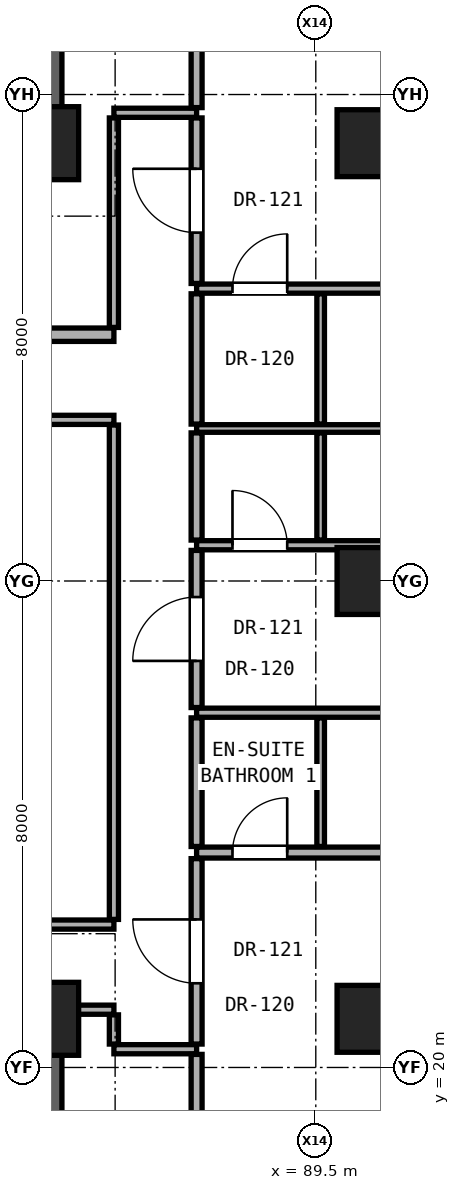
"""IFC4 building model, lengths in metres.
Left out: names, types, materials, properties, quantities, classifications, styles, units other than length and angle.
Written with IfcOpenShell. Run it as: python <this file> out.ifc"""

import sys

from ifc_helpers import new_model, si_unit, direction, frame, frame_2d, origin, origin_2d, place, context, subcontext, project, spatial, rectangle, hollow_rectangle, extrude, element, fill, save


model = new_model("IFC4")
c1 = context("Model", 3, precision=1e-05, world=origin(), true_north=direction((0.0, 1.0)))
c2 = subcontext(c1, "Body", "Model", "MODEL_VIEW")
j1 = project(units=[si_unit("LENGTHUNIT", "METRE"), si_unit("PLANEANGLEUNIT", "RADIAN")], contexts=[c1])
p1 = place(None, origin())
s1 = spatial("IfcSite", under=j1, at=p1, CompositionType="ELEMENT")
p2 = place(p1, origin())
s2 = spatial("IfcBuilding", under=s1, at=p2, CompositionType="ELEMENT")
p3 = place(p2, frame((0.0, 0.0, 108.2)))
s3 = spatial("IfcBuildingStorey", under=s2, at=p3, CompositionType="ELEMENT", Elevation=108.2)
for number, where, z_axis, x_axis in (
    (1, (85.0, 20.8, 0.0), (0.0, 0.0, 1.0), (1.0, 0.0, 0.0)),
    (2, (85.0, 35.2, 0.0), (0.0, 0.0, 1.0), (1.0, 0.0, 0.0)),
):
    element("IfcColumn", number, at=place(p3, frame(where, z_axis=z_axis, x_axis=x_axis)), inside=s3, PredefinedType="COLUMN", context=c2, shape_type="SweptSolid", body=[
        extrude(rectangle(XDim=1.2, YDim=1.2, at=origin_2d()), origin(), (0.0, 0.0, 1.0), 3.3),
    ])
for number, where, z_axis, x_axis in (
    (3, (90.4, 20.8, 0.0), (0.0, 0.0, 1.0), (1.0, 0.0, 0.0)),
    (4, (90.4, 28.0, 0.0), (0.0, 0.0, 1.0), (1.0, 0.0, 0.0)),
    (5, (90.4, 35.2, 0.0), (0.0, 0.0, 1.0), (1.0, 0.0, 0.0)),
):
    element("IfcColumn", number, at=place(p3, frame(where, z_axis=z_axis, x_axis=x_axis)), inside=s3, PredefinedType="COLUMN", context=c2, shape_type="SweptSolid", body=[
        extrude(hollow_rectangle(XDim=1.1, YDim=1.1, WallThickness=0.06, at=origin_2d()), origin(), (0.0, 0.0, 1.0), 3.3),
    ])
for number, where, z_axis, x_axis in (
    (6, (85.0, 35.2, 0.0), (0.0, 0.0, 1.0), (0.0, 1.0, 0.0)),
    (7, (85.0, 15.2, 0.0), (0.0, 0.0, 1.0), (0.0, 1.0, 0.0)),
):
    element("IfcWall", number, at=place(p3, frame(where, z_axis=z_axis, x_axis=x_axis)), inside=s3, PredefinedType="SHEAR", context=c2, shape_type="SweptSolid", body=[
        extrude(rectangle(XDim=5.6, YDim=0.65, at=frame_2d((2.8, 0.0))), origin(), (0.0, 0.0, 1.0), 3.08),
    ])
p4 = place(p3, frame((86.18, 20.3, 0.0), z_axis=(0.0, 0.0, 1.0), x_axis=(1.0, 0.0, 0.0)))
e8 = element("IfcWall", 8, at=p4, inside=s3, PredefinedType="PARTITIONING", context=c2, shape_type="SweptSolid", body=[
    extrude(rectangle(XDim=1.36, YDim=0.15, at=frame_2d((0.68, 0.0))), origin(), (0.0, 0.0, 1.0), 3.08),
])
p5 = place(p3, frame((85.32, 20.95, 0.0), z_axis=(0.0, 0.0, 1.0), x_axis=(1.0, 0.0, 0.0)))
e9 = element("IfcWall", 9, at=p5, inside=s3, PredefinedType="PARTITIONING", context=c2, shape_type="SweptSolid", body=[
    extrude(rectangle(XDim=0.86, YDim=0.15, at=frame_2d((0.43, 0.0))), origin(), (0.0, 0.0, 1.0), 2.472),
])
p6 = place(p3, frame((66.68, 22.35, 0.0), z_axis=(0.0, 0.0, 1.0), x_axis=(1.0, 0.0, 0.0)))
e10 = element("IfcWall", 10, at=p6, inside=s3, PredefinedType="PARTITIONING", context=c2, shape_type="SweptSolid", body=[
    extrude(rectangle(XDim=19.5, YDim=0.15, at=frame_2d((9.75, 0.0))), origin(), (0.0, 0.0, 1.0), 2.145),
])
p7 = place(p6, frame((8.053, 0.0, 0.0)))
e11 = element("IfcOpeningElement", 11, at=p7, cuts=e10, PredefinedType="OPENING", context=c2, shape_type="SweptSolid", body=[
    extrude(rectangle(XDim=0.85, YDim=2.01, at=frame_2d((0.425, 1.005))), frame((0.0, 0.085, 0.0), z_axis=(0.0, -1.0, 0.0), x_axis=(1.0, 0.0, 0.0)), (0.0, 0.0, 1.0), 0.17),
])
p8 = place(p3, frame((87.54, 23.534, 0.0), z_axis=(0.0, 0.0, 1.0), x_axis=(1.0, 0.0, 0.0)))
e12 = element("IfcWall", 12, at=p8, inside=s3, PredefinedType="PARTITIONING", context=c2, shape_type="SweptSolid", body=[
    extrude(rectangle(XDim=7.53, YDim=0.18, at=frame_2d((3.765, 0.0))), origin(), (0.0, 0.0, 1.0), 2.216),
])
p9 = place(p8, frame((4.29, 0.0, 0.0)))
e13 = element("IfcOpeningElement", 13, at=p9, cuts=e12, PredefinedType="OPENING", context=c2, shape_type="SweptSolid", body=[
    extrude(rectangle(XDim=0.95, YDim=2.15, at=frame_2d((0.475, 1.075))), frame((0.0, 0.1, 0.0), z_axis=(0.0, -1.0, 0.0), x_axis=(1.0, 0.0, 0.0)), (0.0, 0.0, 1.0), 0.2),
])
p10 = place(p8, frame((0.59, 0.0, 0.0)))
e14 = element("IfcOpeningElement", 14, at=p10, cuts=e12, PredefinedType="OPENING", context=c2, shape_type="SweptSolid", body=[
    extrude(rectangle(XDim=0.9, YDim=2.1, at=frame_2d((0.45, 1.05))), frame((0.0, 0.1, 0.0), z_axis=(0.0, -1.0, 0.0), x_axis=(1.0, 0.0, 0.0)), (0.0, 0.0, 1.0), 0.2),
])
p11 = place(p3, frame((87.54, 25.834, 0.0), z_axis=(0.0, 0.0, 1.0), x_axis=(1.0, 0.0, 0.0)))
e15 = element("IfcWall", 15, at=p11, inside=s3, PredefinedType="PARTITIONING", context=c2, shape_type="SweptSolid", body=[
    extrude(rectangle(XDim=7.53, YDim=0.15, at=frame_2d((3.765, 0.0))), origin(), (0.0, 0.0, 1.0), 2.216),
])
p12 = place(p3, frame((87.54, 28.588, 0.0), z_axis=(0.0, 0.0, 1.0), x_axis=(1.0, 0.0, 0.0)))
e16 = element("IfcWall", 16, at=p12, inside=s3, PredefinedType="PARTITIONING", context=c2, shape_type="SweptSolid", body=[
    extrude(rectangle(XDim=7.53, YDim=0.15, at=frame_2d((3.765, 0.0))), origin(), (0.0, 0.0, 1.0), 2.216),
])
p13 = place(p12, frame((4.29, 0.0, 0.0)))
e17 = element("IfcOpeningElement", 17, at=p13, cuts=e16, PredefinedType="OPENING", context=c2, shape_type="SweptSolid", body=[
    extrude(rectangle(XDim=0.95, YDim=2.15, at=frame_2d((0.475, 1.075))), frame((0.0, 0.085, 0.0), z_axis=(0.0, -1.0, 0.0), x_axis=(1.0, 0.0, 0.0)), (0.0, 0.0, 1.0), 0.17),
])
p14 = place(p12, frame((0.59, 0.0, 0.0)))
e18 = element("IfcOpeningElement", 18, at=p14, cuts=e16, PredefinedType="OPENING", context=c2, shape_type="SweptSolid", body=[
    extrude(rectangle(XDim=0.9, YDim=2.1, at=frame_2d((0.45, 1.05))), frame((0.0, 0.085, 0.0), z_axis=(0.0, -1.0, 0.0), x_axis=(1.0, 0.0, 0.0)), (0.0, 0.0, 1.0), 0.17),
])
p15 = place(p3, frame((66.68, 30.65, 0.0), z_axis=(0.0, 0.0, 1.0), x_axis=(1.0, 0.0, 0.0)))
e19 = element("IfcWall", 19, at=p15, inside=s3, PredefinedType="PARTITIONING", context=c2, shape_type="SweptSolid", body=[
    extrude(rectangle(XDim=19.5, YDim=0.15, at=frame_2d((9.75, 0.0))), origin(), (0.0, 0.0, 1.0), 2.145),
])
p16 = place(p15, frame((3.795, 0.0, 0.0)))
e20 = element("IfcOpeningElement", 20, at=p16, cuts=e19, PredefinedType="OPENING", context=c2, shape_type="SweptSolid", body=[
    extrude(rectangle(XDim=0.85, YDim=2.01, at=frame_2d((0.425, 1.005))), frame((0.0, 0.085, 0.0), z_axis=(0.0, -1.0, 0.0), x_axis=(1.0, 0.0, 0.0)), (0.0, 0.0, 1.0), 0.17),
])
p17 = place(p15, frame((15.098, 0.0, 0.0)))
e21 = element("IfcOpeningElement", 21, at=p17, cuts=e19, PredefinedType="OPENING", context=c2, shape_type="SweptSolid", body=[
    extrude(rectangle(XDim=0.85, YDim=2.01, at=frame_2d((0.425, 1.005))), frame((0.0, 0.085, 0.0), z_axis=(0.0, -1.0, 0.0), x_axis=(1.0, 0.0, 0.0)), (0.0, 0.0, 1.0), 0.17),
])
p18 = place(p3, frame((87.54, 30.508, 0.0), z_axis=(0.0, 0.0, 1.0), x_axis=(1.0, 0.0, 0.0)))
e22 = element("IfcWall", 22, at=p18, inside=s3, PredefinedType="PARTITIONING", context=c2, shape_type="SweptSolid", body=[
    extrude(rectangle(XDim=7.53, YDim=0.125, at=frame_2d((3.765, 0.0))), origin(), (0.0, 0.0, 1.0), 2.216),
])
p19 = place(p3, frame((71.55, 32.05, 0.0), z_axis=(0.0, 0.0, 1.0), x_axis=(1.0, 0.0, 0.0)))
e23 = element("IfcWall", 23, at=p19, inside=s3, PredefinedType="SOLIDWALL", context=c2, shape_type="SweptSolid", body=[
    extrude(rectangle(XDim=14.63, YDim=0.22, at=frame_2d((7.315, 0.0))), origin(), (0.0, 0.0, 1.0), 2.145),
])
p20 = place(p19, frame((6.065, 0.0, 0.0)))
e24 = element("IfcOpeningElement", 24, at=p20, cuts=e23, PredefinedType="OPENING", context=c2, shape_type="SweptSolid", body=[
    extrude(rectangle(XDim=0.85, YDim=2.01, at=frame_2d((0.425, 1.005))), frame((0.0, 0.12, 0.0), z_axis=(0.0, -1.0, 0.0), x_axis=(1.0, 0.0, 0.0)), (0.0, 0.0, 1.0), 0.24),
])
p21 = place(p19, frame((10.585, 0.0, 0.0)))
e25 = element("IfcOpeningElement", 25, at=p21, cuts=e23, PredefinedType="OPENING", context=c2, shape_type="SweptSolid", body=[
    extrude(rectangle(XDim=0.85, YDim=2.01, at=frame_2d((0.425, 1.005))), frame((0.0, 0.12, 0.0), z_axis=(0.0, -1.0, 0.0), x_axis=(1.0, 0.0, 0.0)), (0.0, 0.0, 1.0), 0.24),
])
p22 = place(p19, frame((1.65, 0.0, 0.0)))
e26 = element("IfcOpeningElement", 26, at=p22, cuts=e23, PredefinedType="OPENING", context=c2, shape_type="SweptSolid", body=[
    extrude(rectangle(XDim=0.85, YDim=2.01, at=frame_2d((0.425, 1.005))), frame((0.0, 0.12, 0.0), z_axis=(0.0, -1.0, 0.0), x_axis=(1.0, 0.0, 0.0)), (0.0, 0.0, 1.0), 0.24),
])
p23 = place(p3, frame((87.54, 32.808, 0.0), z_axis=(0.0, 0.0, 1.0), x_axis=(1.0, 0.0, 0.0)))
e27 = element("IfcWall", 27, at=p23, inside=s3, PredefinedType="PARTITIONING", context=c2, shape_type="SweptSolid", body=[
    extrude(rectangle(XDim=7.53, YDim=0.15, at=frame_2d((3.765, 0.0))), origin(), (0.0, 0.0, 1.0), 2.216),
])
p24 = place(p23, frame((4.29, 0.0, 0.0)))
e28 = element("IfcOpeningElement", 28, at=p24, cuts=e27, PredefinedType="OPENING", context=c2, shape_type="SweptSolid", body=[
    extrude(rectangle(XDim=0.95, YDim=2.15, at=frame_2d((0.475, 1.075))), frame((0.0, 0.085, 0.0), z_axis=(0.0, -1.0, 0.0), x_axis=(1.0, 0.0, 0.0)), (0.0, 0.0, 1.0), 0.17),
])
p25 = place(p23, frame((0.59, 0.0, 0.0)))
e29 = element("IfcOpeningElement", 29, at=p25, cuts=e27, PredefinedType="OPENING", context=c2, shape_type="SweptSolid", body=[
    extrude(rectangle(XDim=0.9, YDim=2.1, at=frame_2d((0.45, 1.05))), frame((0.0, 0.085, 0.0), z_axis=(0.0, -1.0, 0.0), x_axis=(1.0, 0.0, 0.0)), (0.0, 0.0, 1.0), 0.17),
])
p26 = place(p3, frame((86.18, 35.7, 0.0), z_axis=(0.0, 0.0, 1.0), x_axis=(1.0, 0.0, 0.0)))
e30 = element("IfcWall", 30, at=p26, inside=s3, PredefinedType="PARTITIONING", context=c2, shape_type="SweptSolid", body=[
    extrude(rectangle(XDim=1.36, YDim=0.15, at=frame_2d((0.68, 0.0))), origin(), (0.0, 0.0, 1.0), 3.08),
])
p27 = place(p3, frame((86.18, 20.385, 0.0), z_axis=(0.0, 0.0, 1.0), x_axis=(0.0, 1.0, 0.0)))
e31 = element("IfcWall", 31, at=p27, inside=s3, PredefinedType="PARTITIONING", context=c2, shape_type="SweptSolid", body=[
    extrude(rectangle(XDim=0.48, YDim=0.15, at=frame_2d((0.24, 0.0))), origin(), (0.0, 0.0, 1.0), 2.472),
])
p28 = place(p3, frame((86.18, 22.435, 0.0), z_axis=(0.0, 0.0, 1.0), x_axis=(0.0, 1.0, 0.0)))
e32 = element("IfcWall", 32, at=p28, inside=s3, PredefinedType="PARTITIONING", context=c2, shape_type="SweptSolid", body=[
    extrude(rectangle(XDim=8.13, YDim=0.15, at=frame_2d((4.065, 0.0))), origin(), (0.0, 0.0, 1.0), 2.299),
])
p29 = place(p3, frame((86.18, 32.17, 0.0), z_axis=(0.0, 0.0, 1.0), x_axis=(0.0, 1.0, 0.0)))
e33 = element("IfcWall", 33, at=p29, inside=s3, PredefinedType="PARTITIONING", context=c2, shape_type="SweptSolid", body=[
    extrude(rectangle(XDim=3.445, YDim=0.15, at=frame_2d((1.723, 0.0))), origin(), (0.0, 0.0, 1.0), 2.472),
])
p30 = place(p3, frame((87.54, 16.519, 0.0), z_axis=(0.0, 0.0, 1.0), x_axis=(0.0, 1.0, 0.0)))
e34 = element("IfcWall", 34, at=p30, inside=s3, PredefinedType="PARTITIONING", context=c2, shape_type="SweptSolid", body=[
    extrude(rectangle(XDim=3.696, YDim=0.18, at=frame_2d((1.848, 0.0))), origin(), (0.0, 0.0, 1.0), 2.456),
])
p31 = place(p3, frame((87.54, 20.385, 0.0), z_axis=(0.0, 0.0, 1.0), x_axis=(0.0, 1.0, 0.0)))
e35 = element("IfcWall", 35, at=p31, inside=s3, PredefinedType="PARTITIONING", context=c2, shape_type="SweptSolid", body=[
    extrude(rectangle(XDim=3.049, YDim=0.18, at=frame_2d((1.524, 0.0))), origin(), (0.0, 0.0, 1.0), 2.472),
])
p32 = place(p31, frame((1.0, 0.0, 0.0)))
e36 = element("IfcOpeningElement", 36, at=p32, cuts=e35, PredefinedType="OPENING", context=c2, shape_type="SweptSolid", body=[
    extrude(rectangle(XDim=1.05, YDim=2.2, at=frame_2d((0.525, 1.1))), frame((0.0, 0.1, 0.0), z_axis=(0.0, -1.0, 0.0), x_axis=(1.0, 0.0, 0.0)), (0.0, 0.0, 1.0), 0.2),
])
p33 = place(p3, frame((87.54, 23.634, 0.0), z_axis=(0.0, 0.0, 1.0), x_axis=(0.0, 1.0, 0.0)))
e37 = element("IfcWall", 37, at=p33, inside=s3, PredefinedType="PARTITIONING", context=c2, shape_type="SweptSolid", body=[
    extrude(rectangle(XDim=2.115, YDim=0.18, at=frame_2d((1.058, 0.0))), origin(), (0.0, 0.0, 1.0), 3.08),
])
p34 = place(p3, frame((87.54, 25.919, 0.0), z_axis=(0.0, 0.0, 1.0), x_axis=(0.0, 1.0, 0.0)))
e38 = element("IfcWall", 38, at=p34, inside=s3, PredefinedType="PARTITIONING", context=c2, shape_type="SweptSolid", body=[
    extrude(rectangle(XDim=2.584, YDim=0.18, at=frame_2d((1.292, 0.0))), origin(), (0.0, 0.0, 1.0), 2.299),
])
p35 = place(p34, frame((0.767, 0.0, 0.0)))
e39 = element("IfcOpeningElement", 39, at=p35, cuts=e38, PredefinedType="OPENING", context=c2, shape_type="SweptSolid", body=[
    extrude(rectangle(XDim=1.05, YDim=2.2, at=frame_2d((0.525, 1.1))), frame((0.0, 0.1, 0.0), z_axis=(0.0, -1.0, 0.0), x_axis=(1.0, 0.0, 0.0)), (0.0, 0.0, 1.0), 0.2),
])
p36 = place(p3, frame((87.54, 28.673, 0.0), z_axis=(0.0, 0.0, 1.0), x_axis=(0.0, 1.0, 0.0)))
e40 = element("IfcWall", 40, at=p36, inside=s3, PredefinedType="PARTITIONING", context=c2, shape_type="SweptSolid", body=[
    extrude(rectangle(XDim=1.762, YDim=0.18, at=frame_2d((0.881, 0.0))), origin(), (0.0, 0.0, 1.0), 3.08),
])
p37 = place(p3, frame((87.54, 30.581, 0.0), z_axis=(0.0, 0.0, 1.0), x_axis=(0.0, 1.0, 0.0)))
e41 = element("IfcWall", 41, at=p37, inside=s3, PredefinedType="PARTITIONING", context=c2, shape_type="SweptSolid", body=[
    extrude(rectangle(XDim=2.142, YDim=0.18, at=frame_2d((1.071, 0.0))), origin(), (0.0, 0.0, 1.0), 3.08),
])
p38 = place(p3, frame((87.54, 32.893, 0.0), z_axis=(0.0, 0.0, 1.0), x_axis=(0.0, 1.0, 0.0)))
e42 = element("IfcWall", 42, at=p38, inside=s3, PredefinedType="PARTITIONING", context=c2, shape_type="SweptSolid", body=[
    extrude(rectangle(XDim=2.722, YDim=0.18, at=frame_2d((1.361, 0.0))), origin(), (0.0, 0.0, 1.0), 2.472),
])
p39 = place(p38, frame((0.836, 0.0, 0.0)))
e43 = element("IfcOpeningElement", 43, at=p39, cuts=e42, PredefinedType="OPENING", context=c2, shape_type="SweptSolid", body=[
    extrude(rectangle(XDim=1.05, YDim=2.2, at=frame_2d((0.525, 1.1))), frame((0.0, 0.1, 0.0), z_axis=(0.0, -1.0, 0.0), x_axis=(1.0, 0.0, 0.0)), (0.0, 0.0, 1.0), 0.2),
])
p40 = place(p3, frame((87.54, 35.785, 0.0), z_axis=(0.0, 0.0, 1.0), x_axis=(0.0, 1.0, 0.0)))
e44 = element("IfcWall", 44, at=p40, inside=s3, PredefinedType="PARTITIONING", context=c2, shape_type="SweptSolid", body=[
    extrude(rectangle(XDim=3.711, YDim=0.18, at=frame_2d((1.855, 0.0))), origin(), (0.0, 0.0, 1.0), 2.456),
])
p41 = place(p3, frame((89.58, 23.634, 0.0), z_axis=(0.0, 0.0, 1.0), x_axis=(0.0, 1.0, 0.0)))
e45 = element("IfcWall", 45, at=p41, inside=s3, PredefinedType="PARTITIONING", context=c2, shape_type="SweptSolid", body=[
    extrude(rectangle(XDim=2.115, YDim=0.125, at=frame_2d((1.058, 0.0))), origin(), (0.0, 0.0, 1.0), 3.08),
])
p42 = place(p3, frame((89.58, 28.673, 0.0), z_axis=(0.0, 0.0, 1.0), x_axis=(0.0, 1.0, 0.0)))
e46 = element("IfcWall", 46, at=p42, inside=s3, PredefinedType="PARTITIONING", context=c2, shape_type="SweptSolid", body=[
    extrude(rectangle(XDim=1.762, YDim=0.125, at=frame_2d((0.881, 0.0))), origin(), (0.0, 0.0, 1.0), 3.08),
])
p43 = place(p3, frame((89.58, 30.581, 0.0), z_axis=(0.0, 0.0, 1.0), x_axis=(0.0, 1.0, 0.0)))
e47 = element("IfcWall", 47, at=p43, inside=s3, PredefinedType="PARTITIONING", context=c2, shape_type="SweptSolid", body=[
    extrude(rectangle(XDim=2.142, YDim=0.125, at=frame_2d((1.071, 0.0))), origin(), (0.0, 0.0, 1.0), 3.08),
])
p44 = place(p32, origin())
e48 = element("IfcDoor", 48, at=p44, inside=s3, OperationType="SINGLE_SWING_RIGHT", PredefinedType="DOOR", context=c2, shape_type="SweptSolid", body=[
    extrude(rectangle(XDim=1.05, YDim=2.2, at=frame_2d((0.525, 1.1))), frame((0.0, 0.025, 0.0), z_axis=(0.0, -1.0, 0.0), x_axis=(1.0, 0.0, 0.0)), (0.0, 0.0, 1.0), 0.05),
])
fill(e36, e48)
p45 = place(p10, origin())
e49 = element("IfcDoor", 49, at=p45, inside=s3, OperationType="SINGLE_SWING_RIGHT", PredefinedType="DOOR", context=c2, shape_type="SweptSolid", body=[
    extrude(rectangle(XDim=0.9, YDim=2.1, at=frame_2d((0.45, 1.05))), frame((0.0, 0.025, 0.0), z_axis=(0.0, -1.0, 0.0), x_axis=(1.0, 0.0, 0.0)), (0.0, 0.0, 1.0), 0.05),
])
fill(e14, e49)
p46 = place(p35, origin())
e50 = element("IfcDoor", 50, at=p46, inside=s3, OperationType="SINGLE_SWING_LEFT", PredefinedType="DOOR", context=c2, shape_type="SweptSolid", body=[
    extrude(rectangle(XDim=1.05, YDim=2.2, at=frame_2d((0.525, 1.1))), frame((0.0, 0.025, 0.0), z_axis=(0.0, -1.0, 0.0), x_axis=(1.0, 0.0, 0.0)), (0.0, 0.0, 1.0), 0.05),
])
fill(e39, e50)
p47 = place(p14, origin())
e51 = element("IfcDoor", 51, at=p47, inside=s3, OperationType="SINGLE_SWING_LEFT", PredefinedType="DOOR", context=c2, shape_type="SweptSolid", body=[
    extrude(rectangle(XDim=0.9, YDim=2.1, at=frame_2d((0.45, 1.05))), frame((0.0, 0.025, 0.0), z_axis=(0.0, -1.0, 0.0), x_axis=(1.0, 0.0, 0.0)), (0.0, 0.0, 1.0), 0.05),
])
fill(e18, e51)
p48 = place(p39, origin())
e52 = element("IfcDoor", 52, at=p48, inside=s3, OperationType="SINGLE_SWING_RIGHT", PredefinedType="DOOR", context=c2, shape_type="SweptSolid", body=[
    extrude(rectangle(XDim=1.05, YDim=2.2, at=frame_2d((0.525, 1.1))), frame((0.0, 0.025, 0.0), z_axis=(0.0, -1.0, 0.0), x_axis=(1.0, 0.0, 0.0)), (0.0, 0.0, 1.0), 0.05),
])
fill(e43, e52)
p49 = place(p25, origin())
e53 = element("IfcDoor", 53, at=p49, inside=s3, OperationType="SINGLE_SWING_RIGHT", PredefinedType="DOOR", context=c2, shape_type="SweptSolid", body=[
    extrude(rectangle(XDim=0.9, YDim=2.1, at=frame_2d((0.45, 1.05))), frame((0.0, 0.025, 0.0), z_axis=(0.0, -1.0, 0.0), x_axis=(1.0, 0.0, 0.0)), (0.0, 0.0, 1.0), 0.05),
])
fill(e29, e53)
save(model, sys.argv[1])
